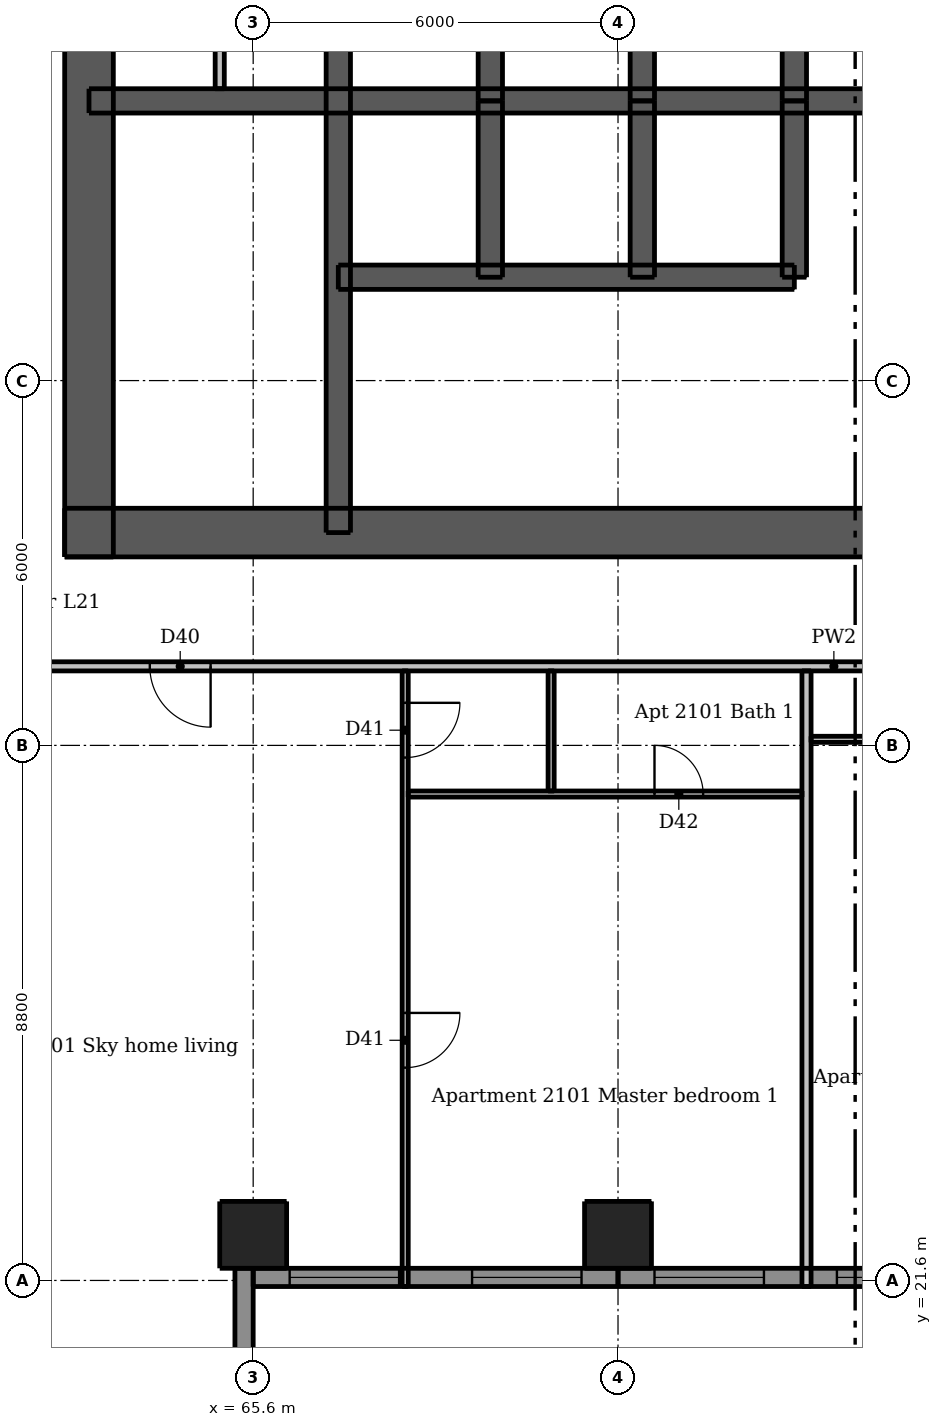
"""IFC4 building model, lengths in metres.
Left out: names, types, materials, properties, quantities, classifications, styles, units other than length and angle.
Written with IfcOpenShell. Run it as: python <this file> out.ifc"""

import sys

from ifc_helpers import new_model, si_unit, direction, frame, frame_2d, origin, origin_2d, place, context, subcontext, project, spatial, rectangle, extrude, element, fill, save


model = new_model("IFC4")
c1 = context("Model", 3, precision=1e-05, world=origin(), true_north=direction((0.0, 1.0)))
c2 = subcontext(c1, "Body", "Model", "MODEL_VIEW")
j1 = project(units=[si_unit("LENGTHUNIT", "METRE"), si_unit("PLANEANGLEUNIT", "RADIAN")], contexts=[c1])
p1 = place(None, origin())
s1 = spatial("IfcSite", under=j1, at=p1, CompositionType="ELEMENT")
p2 = place(p1, origin())
s2 = spatial("IfcBuilding", under=s1, at=p2, CompositionType="ELEMENT")
p3 = place(p2, frame((0.0, 0.0, 82.0)))
s3 = spatial("IfcBuildingStorey", under=s2, at=p3, CompositionType="ELEMENT", Elevation=82.0)
p4 = place(p3, frame((62.5, 33.9, 0.0), z_axis=(0.0, 0.0, 1.0), x_axis=(1.0, 0.0, 0.0)))
e1 = element("IfcWall", 1, at=p4, inside=s3, PredefinedType="SHEAR", context=c2, shape_type="SweptSolid", body=[
    extrude(rectangle(XDim=24.0, YDim=0.8, at=frame_2d((12.0, 0.0))), origin(), (0.0, 0.0, 1.0), 3.05),
])
p5 = place(p4, frame((2.0, 0.0, 0.0)))
e2 = element("IfcOpeningElement", 2, at=p5, cuts=e1, PredefinedType="OPENING", context=c2, shape_type="SweptSolid", body=[
    extrude(rectangle(XDim=1.1, YDim=2.1, at=frame_2d((0.55, 1.05))), frame((0.0, 0.41, 0.0), z_axis=(0.0, -1.0, 0.0), x_axis=(1.0, 0.0, 0.0)), (0.0, 0.0, 1.0), 0.82),
])
p6 = place(p4, frame((20.9, 0.0, 0.0)))
e3 = element("IfcOpeningElement", 3, at=p6, cuts=e1, PredefinedType="OPENING", context=c2, shape_type="SweptSolid", body=[
    extrude(rectangle(XDim=1.1, YDim=2.1, at=frame_2d((0.55, 1.05))), frame((0.0, 0.41, 0.0), z_axis=(0.0, -1.0, 0.0), x_axis=(1.0, 0.0, 0.0)), (0.0, 0.0, 1.0), 0.82),
])
p7 = place(p4, frame((8.0, 0.0, 0.0)))
e4 = element("IfcOpeningElement", 4, at=p7, cuts=e1, PredefinedType="OPENING", context=c2, shape_type="SweptSolid", body=[
    extrude(rectangle(XDim=1.1, YDim=2.1, at=frame_2d((0.55, 1.05))), frame((0.0, 0.41, 0.0), z_axis=(0.0, -1.0, 0.0), x_axis=(1.0, 0.0, 0.0)), (0.0, 0.0, 1.0), 0.82),
])
p8 = place(p4, frame((17.488, 0.0, 0.0)))
e5 = element("IfcOpeningElement", 5, at=p8, cuts=e1, PredefinedType="OPENING", context=c2, shape_type="SweptSolid", body=[
    extrude(rectangle(XDim=0.9, YDim=2.1, at=frame_2d((0.45, 1.05))), frame((0.0, 0.41, 0.0), z_axis=(0.0, -1.0, 0.0), x_axis=(1.0, 0.0, 0.0)), (0.0, 0.0, 1.0), 0.82),
])
p9 = place(p3, frame((62.9, 33.5, 0.0), z_axis=(0.0, 0.0, 1.0), x_axis=(0.0, 1.0, 0.0)))
e6 = element("IfcWall", 6, at=p9, inside=s3, PredefinedType="SHEAR", context=c2, shape_type="SweptSolid", body=[
    extrude(rectangle(XDim=24.0, YDim=0.8, at=frame_2d((12.0, 0.0))), origin(), (0.0, 0.0, 1.0), 3.05),
])
p10 = place(p9, frame((11.2, 0.0, 0.0)))
e7 = element("IfcOpeningElement", 7, at=p10, cuts=e6, PredefinedType="OPENING", context=c2, shape_type="SweptSolid", body=[
    extrude(rectangle(XDim=1.6, YDim=2.1, at=frame_2d((0.8, 1.05))), frame((0.0, 0.41, 0.0), z_axis=(0.0, -1.0, 0.0), x_axis=(1.0, 0.0, 0.0)), (0.0, 0.0, 1.0), 0.82),
])
p11 = place(p3, frame((62.9, 41.0, 0.0), z_axis=(0.0, 0.0, 1.0), x_axis=(1.0, 0.0, 0.0)))
e8 = element("IfcWall", 8, at=p11, inside=s3, PredefinedType="SHEAR", context=c2, shape_type="SweptSolid", body=[
    extrude(rectangle(XDim=23.2, YDim=0.4, at=frame_2d((11.6, 0.0))), origin(), (0.0, 0.0, 1.0), 3.05),
])
p12 = place(p3, frame((67.0, 33.9, 0.0), z_axis=(0.0, 0.0, 1.0), x_axis=(0.0, 1.0, 0.0)))
e9 = element("IfcWall", 9, at=p12, inside=s3, PredefinedType="SHEAR", context=c2, shape_type="SweptSolid", body=[
    extrude(rectangle(XDim=10.0, YDim=0.4, at=frame_2d((5.0, 0.0))), origin(), (0.0, 0.0, 1.0), 3.05),
])
p13 = place(p12, frame((0.6, 0.0, 0.0)))
e10 = element("IfcOpeningElement", 10, at=p13, cuts=e9, PredefinedType="OPENING", context=c2, shape_type="SweptSolid", body=[
    extrude(rectangle(XDim=1.1, YDim=2.1, at=frame_2d((0.55, 1.05))), frame((0.0, 0.21, 0.0), z_axis=(0.0, -1.0, 0.0), x_axis=(1.0, 0.0, 0.0)), (0.0, 0.0, 1.0), 0.42),
])
for number, where, z_axis, x_axis in (
    (11, (69.5, 41.0, 0.0), (0.0, 0.0, 1.0), (0.0, 1.0, 0.0)),
    (12, (72.0, 41.0, 0.0), (0.0, 0.0, 1.0), (0.0, 1.0, 0.0)),
    (13, (74.5, 41.0, 0.0), (0.0, 0.0, 1.0), (0.0, 1.0, 0.0)),
):
    element("IfcWall", number, at=place(p3, frame(where, z_axis=z_axis, x_axis=x_axis)), inside=s3, PredefinedType="SHEAR", context=c2, shape_type="SweptSolid", body=[
        extrude(rectangle(XDim=2.9, YDim=0.4, at=frame_2d((1.45, 0.0))), origin(), (0.0, 0.0, 1.0), 3.05),
    ])
p14 = place(p3, frame((67.0, 38.1, 0.0), z_axis=(0.0, 0.0, 1.0), x_axis=(1.0, 0.0, 0.0)))
e14 = element("IfcWall", 14, at=p14, inside=s3, PredefinedType="SHEAR", context=c2, shape_type="SweptSolid", body=[
    extrude(rectangle(XDim=7.5, YDim=0.4, at=frame_2d((3.75, 0.0))), origin(), (0.0, 0.0, 1.0), 3.05),
])
p15 = place(p14, frame((0.7, 0.0, 0.0)))
e15 = element("IfcOpeningElement", 15, at=p15, cuts=e14, PredefinedType="OPENING", context=c2, shape_type="SweptSolid", body=[
    extrude(rectangle(XDim=1.1, YDim=2.1, at=frame_2d((0.55, 1.05))), frame((0.0, 0.21, 0.0), z_axis=(0.0, -1.0, 0.0), x_axis=(1.0, 0.0, 0.0)), (0.0, 0.0, 1.0), 0.42),
])
p16 = place(p14, frame((3.2, 0.0, 0.0)))
e16 = element("IfcOpeningElement", 16, at=p16, cuts=e14, PredefinedType="OPENING", context=c2, shape_type="SweptSolid", body=[
    extrude(rectangle(XDim=1.1, YDim=2.1, at=frame_2d((0.55, 1.05))), frame((0.0, 0.21, 0.0), z_axis=(0.0, -1.0, 0.0), x_axis=(1.0, 0.0, 0.0)), (0.0, 0.0, 1.0), 0.42),
])
p17 = place(p14, frame((5.65, 0.0, 0.0)))
e17 = element("IfcOpeningElement", 17, at=p17, cuts=e14, PredefinedType="OPENING", context=c2, shape_type="SweptSolid", body=[
    extrude(rectangle(XDim=1.2, YDim=2.1, at=frame_2d((0.6, 1.05))), frame((0.0, 0.21, 0.0), z_axis=(0.0, -1.0, 0.0), x_axis=(1.0, 0.0, 0.0)), (0.0, 0.0, 1.0), 0.42),
])
for number, where, z_axis, x_axis in (
    (18, (69.5, 38.1, 0.0), (0.0, 0.0, 1.0), (0.0, 1.0, 0.0)),
    (19, (72.0, 38.1, 0.0), (0.0, 0.0, 1.0), (0.0, 1.0, 0.0)),
    (20, (74.5, 38.1, 0.0), (0.0, 0.0, 1.0), (0.0, 1.0, 0.0)),
):
    element("IfcWall", number, at=place(p3, frame(where, z_axis=z_axis, x_axis=x_axis)), inside=s3, PredefinedType="SHEAR", context=c2, shape_type="SweptSolid", body=[
        extrude(rectangle(XDim=2.9, YDim=0.4, at=frame_2d((1.45, 0.0))), origin(), (0.0, 0.0, 1.0), 3.05),
    ])
for number, where, z_axis, x_axis in (
    (21, (65.6, 22.35, 0.0), (0.0, 0.0, 1.0), (1.0, 0.0, 0.0)),
    (22, (71.6, 22.35, 0.0), (0.0, 0.0, 1.0), (1.0, 0.0, 0.0)),
):
    element("IfcColumn", number, at=place(p3, frame(where, z_axis=z_axis, x_axis=x_axis)), inside=s3, PredefinedType="COLUMN", context=c2, shape_type="SweptSolid", body=[
        extrude(rectangle(XDim=1.1, YDim=1.1, at=origin_2d()), origin(), (0.0, 0.0, 1.0), 3.05),
    ])
p18 = place(p3, frame((65.45, 20.0, 0.0), z_axis=(0.0, 0.0, 1.0), x_axis=(0.0, 1.0, 0.0)))
e23 = element("IfcWall", 23, at=p18, inside=s3, PredefinedType="SOLIDWALL", context=c2, shape_type="SweptSolid", body=[
    extrude(rectangle(XDim=1.8, YDim=0.3, at=frame_2d((0.9, 0.0))), origin(), (0.0, 0.0, 1.0), 3.05),
])
p19 = place(p3, frame((65.6, 21.65, 0.0), z_axis=(0.0, 0.0, 1.0), x_axis=(1.0, 0.0, 0.0)))
e24 = element("IfcWall", 24, at=p19, inside=s3, PredefinedType="SOLIDWALL", context=c2, shape_type="SweptSolid", body=[
    extrude(rectangle(XDim=6.0, YDim=0.3, at=frame_2d((3.0, 0.0))), origin(), (0.0, 0.0, 1.0), 3.05),
])
p20 = place(p19, frame((0.6, 0.0, 0.15)))
e25 = element("IfcOpeningElement", 25, at=p20, cuts=e24, PredefinedType="OPENING", context=c2, shape_type="SweptSolid", body=[
    extrude(rectangle(XDim=1.8, YDim=2.1, at=frame_2d((0.9, 1.05))), frame((0.0, 0.16, 0.0), z_axis=(0.0, -1.0, 0.0), x_axis=(1.0, 0.0, 0.0)), (0.0, 0.0, 1.0), 0.32),
])
p21 = place(p19, frame((3.6, 0.0, 0.15)))
e26 = element("IfcOpeningElement", 26, at=p21, cuts=e24, PredefinedType="OPENING", context=c2, shape_type="SweptSolid", body=[
    extrude(rectangle(XDim=1.8, YDim=2.1, at=frame_2d((0.9, 1.05))), frame((0.0, 0.16, 0.0), z_axis=(0.0, -1.0, 0.0), x_axis=(1.0, 0.0, 0.0)), (0.0, 0.0, 1.0), 0.32),
])
p22 = place(p3, frame((71.6, 21.65, 0.0), z_axis=(0.0, 0.0, 1.0), x_axis=(1.0, 0.0, 0.0)))
e27 = element("IfcWall", 27, at=p22, inside=s3, PredefinedType="SOLIDWALL", context=c2, shape_type="SweptSolid", body=[
    extrude(rectangle(XDim=6.0, YDim=0.3, at=frame_2d((3.0, 0.0))), origin(), (0.0, 0.0, 1.0), 3.05),
])
p23 = place(p22, frame((0.6, 0.0, 0.15)))
e28 = element("IfcOpeningElement", 28, at=p23, cuts=e27, PredefinedType="OPENING", context=c2, shape_type="SweptSolid", body=[
    extrude(rectangle(XDim=1.8, YDim=2.1, at=frame_2d((0.9, 1.05))), frame((0.0, 0.16, 0.0), z_axis=(0.0, -1.0, 0.0), x_axis=(1.0, 0.0, 0.0)), (0.0, 0.0, 1.0), 0.32),
])
p24 = place(p22, frame((3.6, 0.0, 0.15)))
e29 = element("IfcOpeningElement", 29, at=p24, cuts=e27, PredefinedType="OPENING", context=c2, shape_type="SweptSolid", body=[
    extrude(rectangle(XDim=1.8, YDim=2.1, at=frame_2d((0.9, 1.05))), frame((0.0, 0.16, 0.0), z_axis=(0.0, -1.0, 0.0), x_axis=(1.0, 0.0, 0.0)), (0.0, 0.0, 1.0), 0.32),
])
p25 = place(p3, frame((65.05, 41.2, 0.0), z_axis=(0.0, 0.0, 1.0), x_axis=(0.0, 1.0, 0.0)))
e30 = element("IfcWall", 30, at=p25, inside=s3, PredefinedType="PLUMBINGWALL", context=c2, shape_type="SweptSolid", body=[
    extrude(rectangle(XDim=2.5, YDim=0.15, at=frame_2d((1.25, 0.0))), origin(), (0.0, 0.0, 1.0), 3.05),
])
p26 = place(p3, frame((68.1, 31.625, 0.0), z_axis=(0.0, 0.0, 1.0), x_axis=(0.0, -1.0, 0.0)))
e31 = element("IfcWall", 31, at=p26, inside=s3, PredefinedType="PARTITIONING", context=c2, shape_type="SweptSolid", body=[
    extrude(rectangle(XDim=10.125, YDim=0.1, at=frame_2d((5.062, 0.0))), origin(), (0.0, 0.0, 1.0), 3.05),
])
p27 = place(p26, frame((0.525, 0.0, 0.0)))
e32 = element("IfcOpeningElement", 32, at=p27, cuts=e31, PredefinedType="OPENING", context=c2, shape_type="SweptSolid", body=[
    extrude(rectangle(XDim=0.9, YDim=2.1, at=frame_2d((0.45, 1.05))), frame((0.0, 0.06, 0.0), z_axis=(0.0, -1.0, 0.0), x_axis=(1.0, 0.0, 0.0)), (0.0, 0.0, 1.0), 0.12),
])
p28 = place(p26, frame((5.625, 0.0, 0.0)))
e33 = element("IfcOpeningElement", 33, at=p28, cuts=e31, PredefinedType="OPENING", context=c2, shape_type="SweptSolid", body=[
    extrude(rectangle(XDim=0.9, YDim=2.1, at=frame_2d((0.45, 1.05))), frame((0.0, 0.06, 0.0), z_axis=(0.0, -1.0, 0.0), x_axis=(1.0, 0.0, 0.0)), (0.0, 0.0, 1.0), 0.12),
])
p29 = place(p3, frame((70.5, 29.65, 0.0), z_axis=(0.0, 0.0, 1.0), x_axis=(0.0, 1.0, 0.0)))
e34 = element("IfcWall", 34, at=p29, inside=s3, PredefinedType="PARTITIONING", context=c2, shape_type="SweptSolid", body=[
    extrude(rectangle(XDim=1.975, YDim=0.1, at=frame_2d((0.988, 0.0))), origin(), (0.0, 0.0, 1.0), 3.05),
])
p30 = place(p3, frame((88.25, 30.5, 0.0), z_axis=(0.0, 0.0, 1.0), x_axis=(-1.0, 0.0, 0.0)))
e35 = element("IfcWall", 35, at=p30, inside=s3, PredefinedType="PARTITIONING", context=c2, shape_type="SweptSolid", body=[
    extrude(rectangle(XDim=13.475, YDim=0.1, at=frame_2d((6.738, 0.0))), origin(), (0.0, 0.0, 1.0), 3.05),
])
p31 = place(p30, frame((6.3, 0.0, 0.0)))
e36 = element("IfcOpeningElement", 36, at=p31, cuts=e35, PredefinedType="OPENING", context=c2, shape_type="SweptSolid", body=[
    extrude(rectangle(XDim=0.9, YDim=2.1, at=frame_2d((0.45, 1.05))), frame((0.0, 0.06, 0.0), z_axis=(0.0, -1.0, 0.0), x_axis=(1.0, 0.0, 0.0)), (0.0, 0.0, 1.0), 0.12),
])
p32 = place(p30, frame((2.4, 0.0, 0.0)))
e37 = element("IfcOpeningElement", 37, at=p32, cuts=e35, PredefinedType="OPENING", context=c2, shape_type="SweptSolid", body=[
    extrude(rectangle(XDim=0.9, YDim=2.1, at=frame_2d((0.45, 1.05))), frame((0.0, 0.06, 0.0), z_axis=(0.0, -1.0, 0.0), x_axis=(1.0, 0.0, 0.0)), (0.0, 0.0, 1.0), 0.12),
])
p33 = place(p30, frame((4.5, 0.0, 0.0)))
e38 = element("IfcOpeningElement", 38, at=p33, cuts=e35, PredefinedType="OPENING", context=c2, shape_type="SweptSolid", body=[
    extrude(rectangle(XDim=0.9, YDim=2.1, at=frame_2d((0.45, 1.05))), frame((0.0, 0.06, 0.0), z_axis=(0.0, -1.0, 0.0), x_axis=(1.0, 0.0, 0.0)), (0.0, 0.0, 1.0), 0.12),
])
p34 = place(p30, frame((11.35, 0.0, 0.0)))
e39 = element("IfcOpeningElement", 39, at=p34, cuts=e35, PredefinedType="OPENING", context=c2, shape_type="SweptSolid", body=[
    extrude(rectangle(XDim=0.9, YDim=2.1, at=frame_2d((0.45, 1.05))), frame((0.0, 0.06, 0.0), z_axis=(0.0, -1.0, 0.0), x_axis=(1.0, 0.0, 0.0)), (0.0, 0.0, 1.0), 0.12),
])
p35 = place(p30, frame((0.35, 0.0, 0.0)))
e40 = element("IfcOpeningElement", 40, at=p35, cuts=e35, PredefinedType="OPENING", context=c2, shape_type="SweptSolid", body=[
    extrude(rectangle(XDim=0.9, YDim=2.1, at=frame_2d((0.45, 1.05))), frame((0.0, 0.06, 0.0), z_axis=(0.0, -1.0, 0.0), x_axis=(1.0, 0.0, 0.0)), (0.0, 0.0, 1.0), 0.12),
])
p36 = place(p30, frame((8.45, 0.0, 0.0)))
e41 = element("IfcOpeningElement", 41, at=p36, cuts=e35, PredefinedType="OPENING", context=c2, shape_type="SweptSolid", body=[
    extrude(rectangle(XDim=0.8, YDim=2.1, at=frame_2d((0.4, 1.05))), frame((0.0, 0.06, 0.0), z_axis=(0.0, -1.0, 0.0), x_axis=(1.0, 0.0, 0.0)), (0.0, 0.0, 1.0), 0.12),
])
p37 = place(p3, frame((68.15, 29.6, 0.0), z_axis=(0.0, 0.0, 1.0), x_axis=(1.0, 0.0, 0.0)))
e42 = element("IfcWall", 42, at=p37, inside=s3, PredefinedType="PARTITIONING", context=c2, shape_type="SweptSolid", body=[
    extrude(rectangle(XDim=6.475, YDim=0.1, at=frame_2d((3.238, 0.0))), origin(), (0.0, 0.0, 1.0), 3.05),
])
p38 = place(p37, frame((4.05, 0.0, 0.0)))
e43 = element("IfcOpeningElement", 43, at=p38, cuts=e42, PredefinedType="OPENING", context=c2, shape_type="SweptSolid", body=[
    extrude(rectangle(XDim=0.8, YDim=2.1, at=frame_2d((0.4, 1.05))), frame((0.0, 0.06, 0.0), z_axis=(0.0, -1.0, 0.0), x_axis=(1.0, 0.0, 0.0)), (0.0, 0.0, 1.0), 0.12),
])
p39 = place(p3, frame((74.7, 21.5, 0.0), z_axis=(0.0, 0.0, 1.0), x_axis=(0.0, 1.0, 0.0)))
e44 = element("IfcWall", 44, at=p39, inside=s3, PredefinedType="PARTITIONING", context=c2, shape_type="SweptSolid", body=[
    extrude(rectangle(XDim=10.125, YDim=0.15, at=frame_2d((5.062, 0.0))), origin(), (0.0, 0.0, 1.0), 3.05),
])
p40 = place(p3, frame((89.525, 31.7, 0.0), z_axis=(0.0, 0.0, 1.0), x_axis=(-1.0, 0.0, 0.0)))
e45 = element("IfcWall", 45, at=p40, inside=s3, PredefinedType="PARTITIONING", context=c2, shape_type="SweptSolid", body=[
    extrude(rectangle(XDim=28.75, YDim=0.15, at=frame_2d((14.375, 0.0))), origin(), (0.0, 0.0, 1.0), 3.05),
])
p41 = place(p40, frame((24.625, 0.0, 0.0)))
e46 = element("IfcOpeningElement", 46, at=p41, cuts=e45, PredefinedType="OPENING", context=c2, shape_type="SweptSolid", body=[
    extrude(rectangle(XDim=1.0, YDim=2.1, at=frame_2d((0.5, 1.05))), frame((0.0, 0.085, 0.0), z_axis=(0.0, -1.0, 0.0), x_axis=(1.0, 0.0, 0.0)), (0.0, 0.0, 1.0), 0.17),
])
p42 = place(p40, frame((7.525, 0.0, 0.0)))
e47 = element("IfcOpeningElement", 47, at=p42, cuts=e45, PredefinedType="OPENING", context=c2, shape_type="SweptSolid", body=[
    extrude(rectangle(XDim=1.0, YDim=2.1, at=frame_2d((0.5, 1.05))), frame((0.0, 0.085, 0.0), z_axis=(0.0, -1.0, 0.0), x_axis=(1.0, 0.0, 0.0)), (0.0, 0.0, 1.0), 0.17),
])
p43 = place(p20, origin())
e48 = element("IfcWindow", 48, at=p43, inside=s3, PartitioningType="DOUBLE_PANEL_VERTICAL", PredefinedType="WINDOW", context=c2, shape_type="SweptSolid", body=[
    extrude(rectangle(XDim=1.8, YDim=2.1, at=frame_2d((0.9, 1.05))), frame((0.0, 0.03, 0.0), z_axis=(0.0, -1.0, 0.0), x_axis=(1.0, 0.0, 0.0)), (0.0, 0.0, 1.0), 0.06),
])
fill(e25, e48)
p44 = place(p21, origin())
e49 = element("IfcWindow", 49, at=p44, inside=s3, PartitioningType="DOUBLE_PANEL_VERTICAL", PredefinedType="WINDOW", context=c2, shape_type="SweptSolid", body=[
    extrude(rectangle(XDim=1.8, YDim=2.1, at=frame_2d((0.9, 1.05))), frame((0.0, 0.03, 0.0), z_axis=(0.0, -1.0, 0.0), x_axis=(1.0, 0.0, 0.0)), (0.0, 0.0, 1.0), 0.06),
])
fill(e26, e49)
p45 = place(p23, origin())
e50 = element("IfcWindow", 50, at=p45, inside=s3, PartitioningType="DOUBLE_PANEL_VERTICAL", PredefinedType="WINDOW", context=c2, shape_type="SweptSolid", body=[
    extrude(rectangle(XDim=1.8, YDim=2.1, at=frame_2d((0.9, 1.05))), frame((0.0, 0.03, 0.0), z_axis=(0.0, -1.0, 0.0), x_axis=(1.0, 0.0, 0.0)), (0.0, 0.0, 1.0), 0.06),
])
fill(e28, e50)
p46 = place(p24, origin())
e51 = element("IfcWindow", 51, at=p46, inside=s3, PartitioningType="DOUBLE_PANEL_VERTICAL", PredefinedType="WINDOW", context=c2, shape_type="SweptSolid", body=[
    extrude(rectangle(XDim=1.8, YDim=2.1, at=frame_2d((0.9, 1.05))), frame((0.0, 0.03, 0.0), z_axis=(0.0, -1.0, 0.0), x_axis=(1.0, 0.0, 0.0)), (0.0, 0.0, 1.0), 0.06),
])
fill(e29, e51)
p47 = place(p5, origin())
e52 = element("IfcDoor", 52, at=p47, inside=s3, OperationType="SINGLE_SWING_LEFT", PredefinedType="DOOR", context=c2, shape_type="SweptSolid", body=[
    extrude(rectangle(XDim=1.1, YDim=2.1, at=frame_2d((0.55, 1.05))), frame((0.0, 0.388, 0.0), z_axis=(0.0, -1.0, 0.0), x_axis=(1.0, 0.0, 0.0)), (0.0, 0.0, 1.0), 0.05),
])
fill(e2, e52)
p48 = place(p7, origin())
e53 = element("IfcDoor", 53, at=p48, inside=s3, OperationType="SINGLE_SWING_LEFT", PredefinedType="DOOR", context=c2, shape_type="SweptSolid", body=[
    extrude(rectangle(XDim=1.1, YDim=2.1, at=frame_2d((0.55, 1.05))), frame((0.0, 0.388, 0.0), z_axis=(0.0, -1.0, 0.0), x_axis=(1.0, 0.0, 0.0)), (0.0, 0.0, 1.0), 0.05),
])
fill(e4, e53)
p49 = place(p13, origin())
e54 = element("IfcDoor", 54, at=p49, inside=s3, OperationType="SINGLE_SWING_RIGHT", PredefinedType="DOOR", context=c2, shape_type="SweptSolid", body=[
    extrude(rectangle(XDim=1.1, YDim=2.1, at=frame_2d((0.55, 1.05))), frame((0.0, -0.138, 0.0), z_axis=(0.0, -1.0, 0.0), x_axis=(1.0, 0.0, 0.0)), (0.0, 0.0, 1.0), 0.05),
])
fill(e10, e54)
p50 = place(p15, origin())
e55 = element("IfcDoor", 55, at=p50, inside=s3, OperationType="DOUBLE_DOOR_SLIDING", PredefinedType="DOOR", context=c2, shape_type="SweptSolid", body=[
    extrude(rectangle(XDim=1.1, YDim=2.1, at=frame_2d((0.55, 1.05))), frame((0.0, 0.025, 0.0), z_axis=(0.0, -1.0, 0.0), x_axis=(1.0, 0.0, 0.0)), (0.0, 0.0, 1.0), 0.05),
])
fill(e15, e55)
p51 = place(p16, origin())
e56 = element("IfcDoor", 56, at=p51, inside=s3, OperationType="DOUBLE_DOOR_SLIDING", PredefinedType="DOOR", context=c2, shape_type="SweptSolid", body=[
    extrude(rectangle(XDim=1.1, YDim=2.1, at=frame_2d((0.55, 1.05))), frame((0.0, 0.025, 0.0), z_axis=(0.0, -1.0, 0.0), x_axis=(1.0, 0.0, 0.0)), (0.0, 0.0, 1.0), 0.05),
])
fill(e16, e56)
p52 = place(p17, origin())
e57 = element("IfcDoor", 57, at=p52, inside=s3, OperationType="DOUBLE_DOOR_SLIDING", PredefinedType="DOOR", context=c2, shape_type="SweptSolid", body=[
    extrude(rectangle(XDim=1.2, YDim=2.1, at=frame_2d((0.6, 1.05))), frame((0.0, 0.025, 0.0), z_axis=(0.0, -1.0, 0.0), x_axis=(1.0, 0.0, 0.0)), (0.0, 0.0, 1.0), 0.05),
])
fill(e17, e57)
p53 = place(p41, origin())
e58 = element("IfcDoor", 58, at=p53, inside=s3, OperationType="SINGLE_SWING_LEFT", PredefinedType="DOOR", context=c2, shape_type="SweptSolid", body=[
    extrude(rectangle(XDim=1.0, YDim=2.1, at=frame_2d((0.5, 1.05))), frame((0.0, 0.025, 0.0), z_axis=(0.0, -1.0, 0.0), x_axis=(1.0, 0.0, 0.0)), (0.0, 0.0, 1.0), 0.05),
])
fill(e46, e58)
p54 = place(p27, origin())
e59 = element("IfcDoor", 59, at=p54, inside=s3, OperationType="SINGLE_SWING_LEFT", PredefinedType="DOOR", context=c2, shape_type="SweptSolid", body=[
    extrude(rectangle(XDim=0.9, YDim=2.1, at=frame_2d((0.45, 1.05))), frame((0.0, 0.025, 0.0), z_axis=(0.0, -1.0, 0.0), x_axis=(1.0, 0.0, 0.0)), (0.0, 0.0, 1.0), 0.05),
])
fill(e32, e59)
p55 = place(p28, origin())
e60 = element("IfcDoor", 60, at=p55, inside=s3, OperationType="SINGLE_SWING_LEFT", PredefinedType="DOOR", context=c2, shape_type="SweptSolid", body=[
    extrude(rectangle(XDim=0.9, YDim=2.1, at=frame_2d((0.45, 1.05))), frame((0.0, 0.025, 0.0), z_axis=(0.0, -1.0, 0.0), x_axis=(1.0, 0.0, 0.0)), (0.0, 0.0, 1.0), 0.05),
])
fill(e33, e60)
p56 = place(p38, origin())
e61 = element("IfcDoor", 61, at=p56, inside=s3, OperationType="SINGLE_SWING_LEFT", PredefinedType="DOOR", context=c2, shape_type="SweptSolid", body=[
    extrude(rectangle(XDim=0.8, YDim=2.1, at=frame_2d((0.4, 1.05))), frame((0.0, 0.025, 0.0), z_axis=(0.0, -1.0, 0.0), x_axis=(1.0, 0.0, 0.0)), (0.0, 0.0, 1.0), 0.05),
])
fill(e43, e61)
save(model, sys.argv[1])
